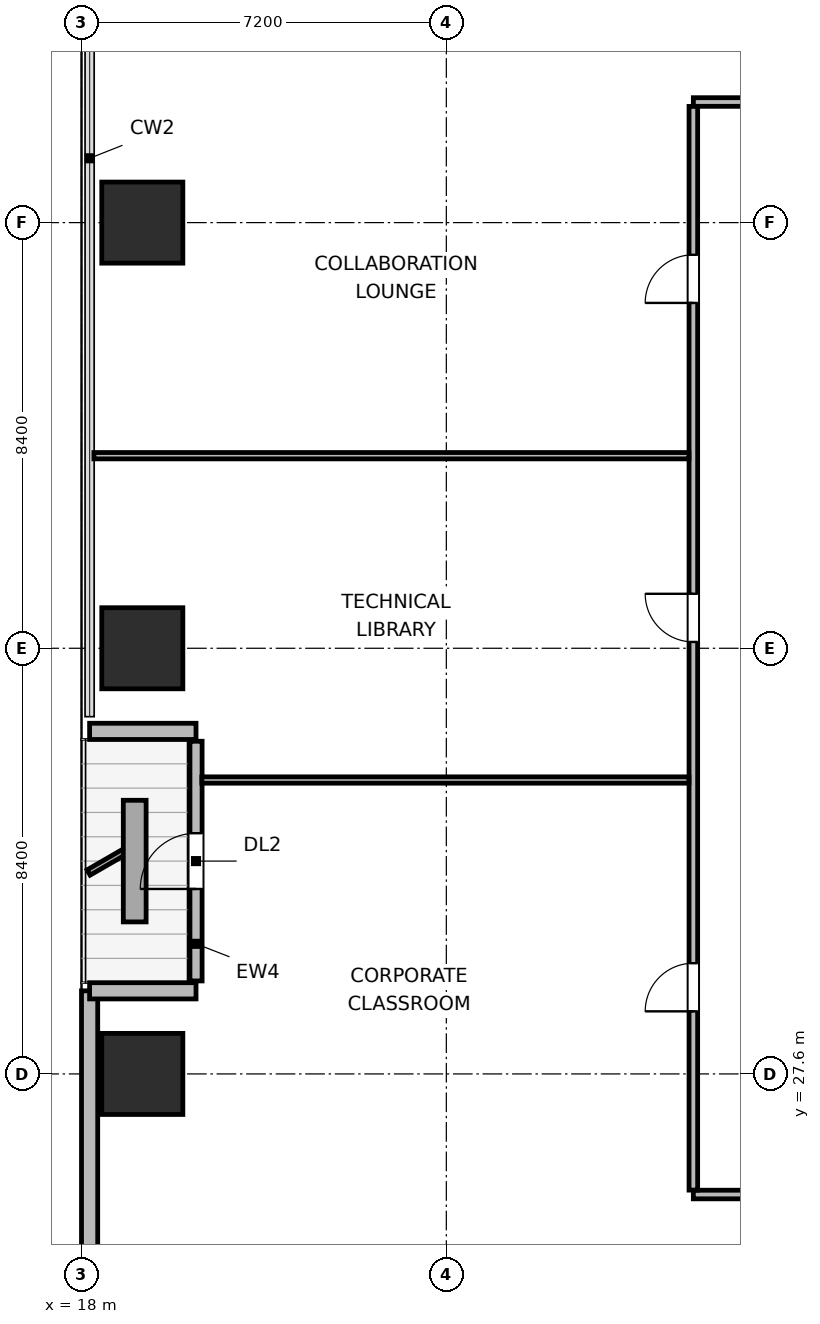
"""IFC4 building model, lengths in metres.
Left out: names, types, materials, properties, quantities, classifications, styles, units other than length and angle.
Written with IfcOpenShell. Run it as: python <this file> out.ifc"""

import sys

from ifc_helpers import new_model, si_unit, direction, frame, frame_2d, origin, origin_2d, place, context, subcontext, project, spatial, rectangle, extrude, element, fill, save


model = new_model("IFC4")
c1 = context("Model", 3, precision=1e-05, world=origin(), true_north=direction((0.0, 1.0)))
c2 = subcontext(c1, "Body", "Model", "MODEL_VIEW")
j1 = project(units=[si_unit("LENGTHUNIT", "METRE"), si_unit("PLANEANGLEUNIT", "RADIAN")], contexts=[c1])
p1 = place(None, origin())
s1 = spatial("IfcSite", under=j1, at=p1, CompositionType="ELEMENT")
p2 = place(p1, origin())
s2 = spatial("IfcBuilding", under=s1, at=p2, CompositionType="ELEMENT")
p3 = place(p2, frame((0.0, 0.0, 33.3)))
s3 = spatial("IfcBuildingStorey", under=s2, at=p3, CompositionType="ELEMENT", Elevation=33.3)
for number, where, z_axis, x_axis in (
    (1, (19.2, 27.6, 0.0), (0.0, 0.0, 1.0), (1.0, 0.0, 0.0)),
    (2, (19.2, 36.0, 0.0), (0.0, 0.0, 1.0), (1.0, 0.0, 0.0)),
    (3, (19.2, 44.4, 0.0), (0.0, 0.0, 1.0), (1.0, 0.0, 0.0)),
):
    element("IfcColumn", number, at=place(p3, frame(where, z_axis=z_axis, x_axis=x_axis)), inside=s3, PredefinedType="COLUMN", context=c2, shape_type="SweptSolid", body=[
        extrude(rectangle(XDim=1.6, YDim=1.6, at=origin_2d()), origin(), (0.0, 0.0, 1.0), 3.9),
    ])
p4 = place(p3, frame((18.16, 15.021, 0.0), z_axis=(0.0, 0.0, 1.0), x_axis=(0.0, 1.0, 0.0)))
e4 = element("IfcWall", 4, at=p4, inside=s3, PredefinedType="SOLIDWALL", context=c2, shape_type="SweptSolid", body=[
    extrude(rectangle(XDim=14.219, YDim=0.32, at=frame_2d((7.109, 0.0))), origin(), (0.0, 0.0, 1.0), 3.64),
])
p5 = place(p3, frame((18.16, 29.24, 0.0), z_axis=(0.0, 0.0, 1.0), x_axis=(1.0, 0.0, 0.0)))
e5 = element("IfcWall", 5, at=p5, inside=s3, PredefinedType="SOLIDWALL", context=c2, shape_type="SweptSolid", body=[
    extrude(rectangle(XDim=2.1, YDim=0.32, at=frame_2d((1.05, 0.0))), origin(), (0.0, 0.0, 1.0), 2.875),
])
p6 = place(p3, frame((20.26, 29.435, 0.0), z_axis=(0.0, 0.0, 1.0), x_axis=(0.0, 1.0, 0.0)))
e6 = element("IfcWall", 6, at=p6, inside=s3, PredefinedType="SOLIDWALL", context=c2, shape_type="SweptSolid", body=[
    extrude(rectangle(XDim=4.73, YDim=0.24, at=frame_2d((2.365, 0.0))), origin(), (0.0, 0.0, 1.0), 3.162),
])
p7 = place(p6, frame((1.815, 0.0, 0.0)))
e7 = element("IfcOpeningElement", 7, at=p7, cuts=e6, PredefinedType="OPENING", context=c2, shape_type="SweptSolid", body=[
    extrude(rectangle(XDim=1.1, YDim=2.04, at=frame_2d((0.55, 1.02))), frame((0.0, 0.13, 0.0), z_axis=(0.0, -1.0, 0.0), x_axis=(1.0, 0.0, 0.0)), (0.0, 0.0, 1.0), 0.26),
])
p8 = place(p3, frame((20.26, 34.36, 0.0), z_axis=(0.0, 0.0, 1.0), x_axis=(-1.0, 0.0, 0.0)))
e8 = element("IfcWall", 8, at=p8, inside=s3, PredefinedType="SOLIDWALL", context=c2, shape_type="SweptSolid", body=[
    extrude(rectangle(XDim=2.1, YDim=0.32, at=frame_2d((1.05, 0.0))), origin(), (0.0, 0.0, 1.0), 2.875),
])
p9 = place(p3, frame((30.075, 25.22, 0.0), z_axis=(0.0, 0.0, 1.0), x_axis=(1.0, 0.0, 0.0)))
e9 = element("IfcWall", 9, at=p9, inside=s3, PredefinedType="PARTITIONING", context=c2, shape_type="SweptSolid", body=[
    extrude(rectangle(XDim=35.85, YDim=0.17, at=frame_2d((17.925, 0.0))), origin(), (0.0, 0.0, 1.0), 3.64),
])
p10 = place(p9, frame((4.308, 0.0, 0.0)))
e10 = element("IfcOpeningElement", 10, at=p10, cuts=e9, PredefinedType="OPENING", context=c2, shape_type="SweptSolid", body=[
    extrude(rectangle(XDim=0.95, YDim=2.04, at=frame_2d((0.475, 1.02))), frame((0.0, 0.095, 0.0), z_axis=(0.0, -1.0, 0.0), x_axis=(1.0, 0.0, 0.0)), (0.0, 0.0, 1.0), 0.19),
])
p11 = place(p9, frame((13.27, 0.0, 0.0)))
e11 = element("IfcOpeningElement", 11, at=p11, cuts=e9, PredefinedType="OPENING", context=c2, shape_type="SweptSolid", body=[
    extrude(rectangle(XDim=0.95, YDim=2.04, at=frame_2d((0.475, 1.02))), frame((0.0, 0.095, 0.0), z_axis=(0.0, -1.0, 0.0), x_axis=(1.0, 0.0, 0.0)), (0.0, 0.0, 1.0), 0.19),
])
p12 = place(p9, frame((21.63, 0.0, 0.0)))
e12 = element("IfcOpeningElement", 12, at=p12, cuts=e9, PredefinedType="OPENING", context=c2, shape_type="SweptSolid", body=[
    extrude(rectangle(XDim=0.95, YDim=2.04, at=frame_2d((0.475, 1.02))), frame((0.0, 0.095, 0.0), z_axis=(0.0, -1.0, 0.0), x_axis=(1.0, 0.0, 0.0)), (0.0, 0.0, 1.0), 0.19),
])
p13 = place(p9, frame((30.592, 0.0, 0.0)))
e13 = element("IfcOpeningElement", 13, at=p13, cuts=e9, PredefinedType="OPENING", context=c2, shape_type="SweptSolid", body=[
    extrude(rectangle(XDim=0.95, YDim=2.04, at=frame_2d((0.475, 1.02))), frame((0.0, 0.095, 0.0), z_axis=(0.0, -1.0, 0.0), x_axis=(1.0, 0.0, 0.0)), (0.0, 0.0, 1.0), 0.19),
])
p14 = place(p3, frame((30.075, 46.78, 0.0), z_axis=(0.0, 0.0, 1.0), x_axis=(1.0, 0.0, 0.0)))
e14 = element("IfcWall", 14, at=p14, inside=s3, PredefinedType="PARTITIONING", context=c2, shape_type="SweptSolid", body=[
    extrude(rectangle(XDim=35.85, YDim=0.17, at=frame_2d((17.925, 0.0))), origin(), (0.0, 0.0, 1.0), 3.64),
])
p15 = place(p14, frame((4.053, 0.0, 0.0)))
e15 = element("IfcOpeningElement", 15, at=p15, cuts=e14, PredefinedType="OPENING", context=c2, shape_type="SweptSolid", body=[
    extrude(rectangle(XDim=0.95, YDim=2.04, at=frame_2d((0.475, 1.02))), frame((0.0, 0.095, 0.0), z_axis=(0.0, -1.0, 0.0), x_axis=(1.0, 0.0, 0.0)), (0.0, 0.0, 1.0), 0.19),
])
p16 = place(p14, frame((11.05, 0.0, 0.0)))
e16 = element("IfcOpeningElement", 16, at=p16, cuts=e14, PredefinedType="OPENING", context=c2, shape_type="SweptSolid", body=[
    extrude(rectangle(XDim=0.95, YDim=2.04, at=frame_2d((0.475, 1.02))), frame((0.0, 0.095, 0.0), z_axis=(0.0, -1.0, 0.0), x_axis=(1.0, 0.0, 0.0)), (0.0, 0.0, 1.0), 0.19),
])
p17 = place(p14, frame((16.55, 0.0, 0.0)))
e17 = element("IfcOpeningElement", 17, at=p17, cuts=e14, PredefinedType="OPENING", context=c2, shape_type="SweptSolid", body=[
    extrude(rectangle(XDim=0.95, YDim=2.04, at=frame_2d((0.475, 1.02))), frame((0.0, 0.095, 0.0), z_axis=(0.0, -1.0, 0.0), x_axis=(1.0, 0.0, 0.0)), (0.0, 0.0, 1.0), 0.19),
])
p18 = place(p14, frame((20.82, 0.0, 0.0)))
e18 = element("IfcOpeningElement", 18, at=p18, cuts=e14, PredefinedType="OPENING", context=c2, shape_type="SweptSolid", body=[
    extrude(rectangle(XDim=0.95, YDim=2.04, at=frame_2d((0.475, 1.02))), frame((0.0, 0.095, 0.0), z_axis=(0.0, -1.0, 0.0), x_axis=(1.0, 0.0, 0.0)), (0.0, 0.0, 1.0), 0.19),
])
p19 = place(p14, frame((25.985, 0.0, 0.0)))
e19 = element("IfcOpeningElement", 19, at=p19, cuts=e14, PredefinedType="OPENING", context=c2, shape_type="SweptSolid", body=[
    extrude(rectangle(XDim=0.95, YDim=2.04, at=frame_2d((0.475, 1.02))), frame((0.0, 0.095, 0.0), z_axis=(0.0, -1.0, 0.0), x_axis=(1.0, 0.0, 0.0)), (0.0, 0.0, 1.0), 0.19),
])
p20 = place(p14, frame((32.643, 0.0, 0.0)))
e20 = element("IfcOpeningElement", 20, at=p20, cuts=e14, PredefinedType="OPENING", context=c2, shape_type="SweptSolid", body=[
    extrude(rectangle(XDim=0.95, YDim=2.04, at=frame_2d((0.475, 1.02))), frame((0.0, 0.095, 0.0), z_axis=(0.0, -1.0, 0.0), x_axis=(1.0, 0.0, 0.0)), (0.0, 0.0, 1.0), 0.19),
])
p21 = place(p3, frame((30.075, 25.307, 0.0), z_axis=(0.0, 0.0, 1.0), x_axis=(0.0, 1.0, 0.0)))
e21 = element("IfcWall", 21, at=p21, inside=s3, PredefinedType="PARTITIONING", context=c2, shape_type="SweptSolid", body=[
    extrude(rectangle(XDim=21.386, YDim=0.17, at=frame_2d((10.693, 0.0))), origin(), (0.0, 0.0, 1.0), 3.64),
])
p22 = place(p21, frame((3.528, 0.0, 0.0)))
e22 = element("IfcOpeningElement", 22, at=p22, cuts=e21, PredefinedType="OPENING", context=c2, shape_type="SweptSolid", body=[
    extrude(rectangle(XDim=0.95, YDim=2.04, at=frame_2d((0.475, 1.02))), frame((0.0, 0.095, 0.0), z_axis=(0.0, -1.0, 0.0), x_axis=(1.0, 0.0, 0.0)), (0.0, 0.0, 1.0), 0.19),
])
p23 = place(p21, frame((10.818, 0.0, 0.0)))
e23 = element("IfcOpeningElement", 23, at=p23, cuts=e21, PredefinedType="OPENING", context=c2, shape_type="SweptSolid", body=[
    extrude(rectangle(XDim=0.95, YDim=2.04, at=frame_2d((0.475, 1.02))), frame((0.0, 0.095, 0.0), z_axis=(0.0, -1.0, 0.0), x_axis=(1.0, 0.0, 0.0)), (0.0, 0.0, 1.0), 0.19),
])
p24 = place(p21, frame((17.508, 0.0, 0.0)))
e24 = element("IfcOpeningElement", 24, at=p24, cuts=e21, PredefinedType="OPENING", context=c2, shape_type="SweptSolid", body=[
    extrude(rectangle(XDim=0.95, YDim=2.04, at=frame_2d((0.475, 1.02))), frame((0.0, 0.095, 0.0), z_axis=(0.0, -1.0, 0.0), x_axis=(1.0, 0.0, 0.0)), (0.0, 0.0, 1.0), 0.19),
])
p25 = place(p3, frame((20.375, 33.4, 0.0), z_axis=(0.0, 0.0, 1.0), x_axis=(1.0, 0.0, 0.0)))
e25 = element("IfcWall", 25, at=p25, inside=s3, PredefinedType="PARTITIONING", context=c2, shape_type="SweptSolid", body=[
    extrude(rectangle(XDim=9.613, YDim=0.125, at=frame_2d((4.807, 0.0))), origin(), (0.0, 0.0, 1.0), 3.64),
])
p26 = place(p3, frame((18.245, 39.8, 0.0), z_axis=(0.0, 0.0, 1.0), x_axis=(1.0, 0.0, 0.0)))
e26 = element("IfcWall", 26, at=p26, inside=s3, PredefinedType="PARTITIONING", context=c2, shape_type="SweptSolid", body=[
    extrude(rectangle(XDim=11.743, YDim=0.125, at=frame_2d((5.872, 0.0))), origin(), (0.0, 0.0, 1.0), 3.64),
])
p27 = place(p7, origin())
e27 = element("IfcDoor", 27, at=p27, inside=s3, OperationType="SINGLE_SWING_LEFT", PredefinedType="DOOR", context=c2, shape_type="SweptSolid", body=[
    extrude(rectangle(XDim=1.1, YDim=2.04, at=frame_2d((0.55, 1.02))), frame((0.0, 0.025, 0.0), z_axis=(0.0, -1.0, 0.0), x_axis=(1.0, 0.0, 0.0)), (0.0, 0.0, 1.0), 0.05),
])
fill(e7, e27)
p28 = place(p22, origin())
e28 = element("IfcDoor", 28, at=p28, inside=s3, OperationType="SINGLE_SWING_LEFT", PredefinedType="DOOR", context=c2, shape_type="SweptSolid", body=[
    extrude(rectangle(XDim=0.95, YDim=2.04, at=frame_2d((0.475, 1.02))), frame((0.0, 0.025, 0.0), z_axis=(0.0, -1.0, 0.0), x_axis=(1.0, 0.0, 0.0)), (0.0, 0.0, 1.0), 0.05),
])
fill(e22, e28)
p29 = place(p23, origin())
e29 = element("IfcDoor", 29, at=p29, inside=s3, OperationType="SINGLE_SWING_RIGHT", PredefinedType="DOOR", context=c2, shape_type="SweptSolid", body=[
    extrude(rectangle(XDim=0.95, YDim=2.04, at=frame_2d((0.475, 1.02))), frame((0.0, 0.025, 0.0), z_axis=(0.0, -1.0, 0.0), x_axis=(1.0, 0.0, 0.0)), (0.0, 0.0, 1.0), 0.05),
])
fill(e23, e29)
p30 = place(p24, origin())
e30 = element("IfcDoor", 30, at=p30, inside=s3, OperationType="SINGLE_SWING_LEFT", PredefinedType="DOOR", context=c2, shape_type="SweptSolid", body=[
    extrude(rectangle(XDim=0.95, YDim=2.04, at=frame_2d((0.475, 1.02))), frame((0.0, 0.025, 0.0), z_axis=(0.0, -1.0, 0.0), x_axis=(1.0, 0.0, 0.0)), (0.0, 0.0, 1.0), 0.05),
])
fill(e24, e30)
save(model, sys.argv[1])
